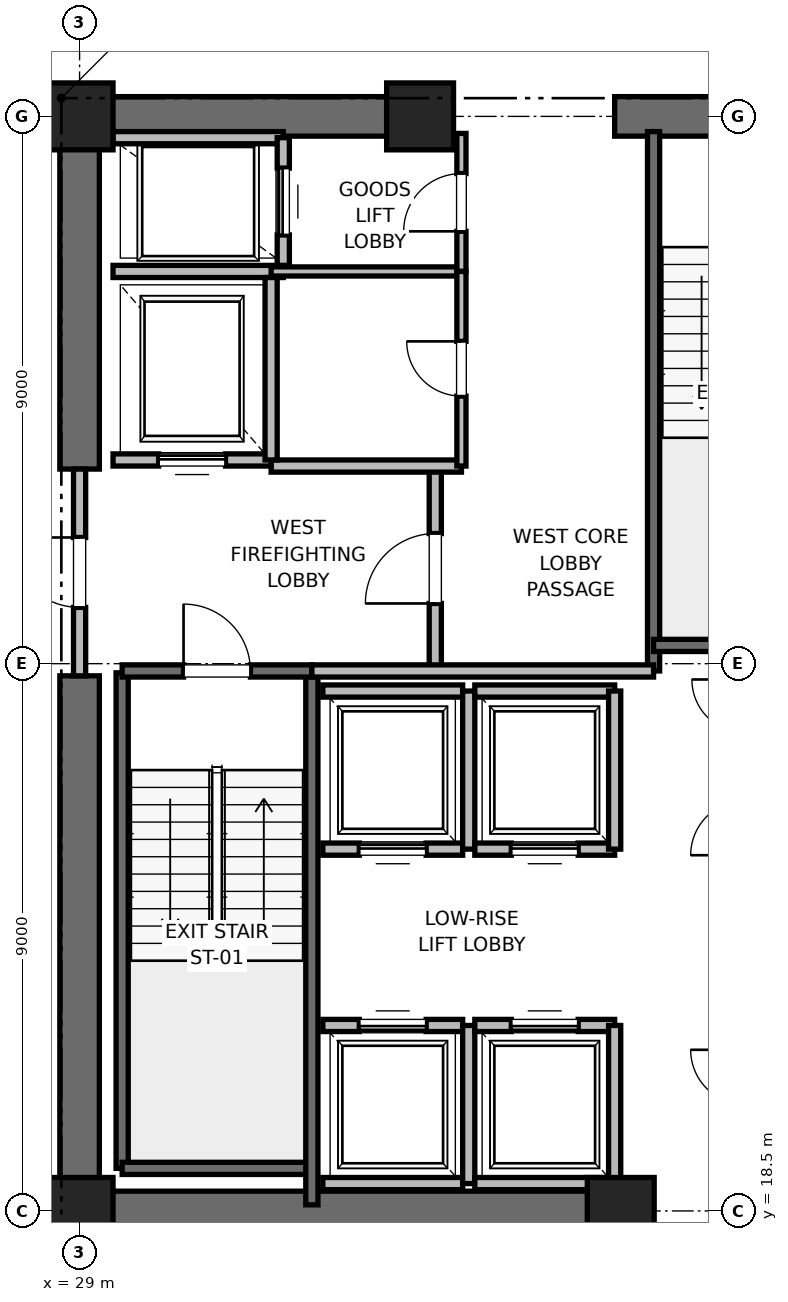
"""IFC4 building model, lengths in metres.
Left out: names, types, materials, properties, quantities, classifications, styles, units other than length and angle.
Written with IfcOpenShell. Run it as: python <this file> out.ifc"""

import sys

from ifc_helpers import new_model, si_unit, direction, frame, frame_2d, origin, origin_2d, place, context, subcontext, project, spatial, rectangle, extrude, element, fill, save


model = new_model("IFC4")
c1 = context("Model", 3, precision=1e-05, world=origin(), true_north=direction((0.0, 1.0)))
c2 = subcontext(c1, "Body", "Model", "MODEL_VIEW")
j1 = project(units=[si_unit("LENGTHUNIT", "METRE"), si_unit("PLANEANGLEUNIT", "RADIAN")], contexts=[c1])
p1 = place(None, origin())
s1 = spatial("IfcSite", under=j1, at=p1, CompositionType="ELEMENT")
p2 = place(p1, origin())
s2 = spatial("IfcBuilding", under=s1, at=p2, CompositionType="ELEMENT")
p3 = place(p2, frame((0.0, 0.0, 83.6)))
s3 = spatial("IfcBuildingStorey", under=s2, at=p3, CompositionType="ELEMENT", Elevation=83.6)
for number, where, z_axis, x_axis in (
    (1, (29.0, 18.5, 0.0), (0.0, 0.0, 1.0), (1.0, 0.0, 0.0)),
    (2, (29.0, 36.5, 0.0), (0.0, 0.0, 1.0), (1.0, 0.0, 0.0)),
    (3, (37.9, 18.5, 0.0), (0.0, 0.0, 1.0), (1.0, 0.0, 0.0)),
    (4, (34.6, 36.5, 0.0), (0.0, 0.0, 1.0), (1.0, 0.0, 0.0)),
):
    element("IfcColumn", number, at=place(p3, frame(where, z_axis=z_axis, x_axis=x_axis)), inside=s3, PredefinedType="PILASTER", context=c2, shape_type="SweptSolid", body=[
        extrude(rectangle(XDim=1.1, YDim=1.1, at=origin_2d()), origin(), (0.0, 0.0, 1.0), 4.0),
    ])
p4 = place(p3, frame((29.0, 18.5, 0.0), z_axis=(0.0, 0.0, 1.0), x_axis=(1.0, 0.0, 0.0)))
e5 = element("IfcWall", 5, at=p4, inside=s3, PredefinedType="SHEAR", context=c2, shape_type="SweptSolid", body=[
    extrude(rectangle(XDim=9.2, YDim=0.65, at=frame_2d((4.6, 0.0))), origin(), (0.0, 0.0, 1.0), 3.76),
])
p5 = place(p3, frame((29.0, 36.5, 0.0), z_axis=(0.0, 0.0, 1.0), x_axis=(1.0, 0.0, 0.0)))
e6 = element("IfcWall", 6, at=p5, inside=s3, PredefinedType="SHEAR", context=c2, shape_type="SweptSolid", body=[
    extrude(rectangle(XDim=5.8, YDim=0.65, at=frame_2d((2.9, 0.0))), origin(), (0.0, 0.0, 1.0), 3.76),
])
p6 = place(p3, frame((37.8, 36.5, 0.0), z_axis=(0.0, 0.0, 1.0), x_axis=(1.0, 0.0, 0.0)))
e7 = element("IfcWall", 7, at=p6, inside=s3, PredefinedType="SHEAR", context=c2, shape_type="SweptSolid", body=[
    extrude(rectangle(XDim=4.4, YDim=0.65, at=frame_2d((2.2, 0.0))), origin(), (0.0, 0.0, 1.0), 3.76),
])
p7 = place(p6, frame((1.65, 0.0, 0.0)))
e8 = element("IfcOpeningElement", 8, at=p7, cuts=e7, PredefinedType="OPENING", context=c2, shape_type="SweptSolid", body=[
    extrude(rectangle(XDim=1.1, YDim=2.15, at=frame_2d((0.55, 1.075))), frame((0.0, 0.325, 0.0), z_axis=(0.0, -1.0, 0.0), x_axis=(1.0, 0.0, 0.0)), (0.0, 0.0, 1.0), 0.65),
])
p8 = place(p3, frame((29.0, 18.5, 0.0), z_axis=(0.0, 0.0, 1.0), x_axis=(0.0, 1.0, 0.0)))
e9 = element("IfcWall", 9, at=p8, inside=s3, PredefinedType="SHEAR", context=c2, shape_type="SweptSolid", body=[
    extrude(rectangle(XDim=8.8, YDim=0.65, at=frame_2d((4.4, 0.0))), origin(), (0.0, 0.0, 1.0), 3.76),
])
p9 = place(p3, frame((29.0, 30.7, 0.0), z_axis=(0.0, 0.0, 1.0), x_axis=(0.0, 1.0, 0.0)))
e10 = element("IfcWall", 10, at=p9, inside=s3, PredefinedType="SHEAR", context=c2, shape_type="SweptSolid", body=[
    extrude(rectangle(XDim=5.8, YDim=0.65, at=frame_2d((2.9, 0.0))), origin(), (0.0, 0.0, 1.0), 3.76),
])
p10 = place(p3, frame((29.7, 19.2, 0.0), z_axis=(0.0, 0.0, 1.0), x_axis=(0.0, 1.0, 0.0)))
e11 = element("IfcWall", 11, at=p10, inside=s3, PredefinedType="SOLIDWALL", context=c2, shape_type="SweptSolid", body=[
    extrude(rectangle(XDim=8.15, YDim=0.2, at=frame_2d((4.075, 0.0))), origin(), (0.0, 0.0, 1.0), 3.76),
])
p11 = place(p3, frame((29.7, 19.2, 0.0), z_axis=(0.0, 0.0, 1.0), x_axis=(1.0, 0.0, 0.0)))
e12 = element("IfcWall", 12, at=p11, inside=s3, PredefinedType="SOLIDWALL", context=c2, shape_type="SweptSolid", body=[
    extrude(rectangle(XDim=3.12, YDim=0.2, at=frame_2d((1.56, 0.0))), origin(), (0.0, 0.0, 1.0), 3.76),
])
p12 = place(p3, frame((32.82, 18.6, 0.0), z_axis=(0.0, 0.0, 1.0), x_axis=(0.0, 1.0, 0.0)))
e13 = element("IfcWall", 13, at=p12, inside=s3, PredefinedType="SOLIDWALL", context=c2, shape_type="SweptSolid", body=[
    extrude(rectangle(XDim=8.78, YDim=0.2, at=frame_2d((4.39, 0.0))), origin(), (0.0, 0.0, 1.0), 3.76),
])
p13 = place(p3, frame((29.7, 27.38, 0.0), z_axis=(0.0, 0.0, 1.0), x_axis=(1.0, 0.0, 0.0)))
e14 = element("IfcWall", 14, at=p13, inside=s3, PredefinedType="SOLIDWALL", context=c2, shape_type="SweptSolid", body=[
    extrude(rectangle(XDim=3.12, YDim=0.2, at=frame_2d((1.56, 0.0))), origin(), (0.0, 0.0, 1.0), 3.76),
])
p14 = place(p13, frame((1.01, 0.0, 0.0)))
e15 = element("IfcOpeningElement", 15, at=p14, cuts=e14, PredefinedType="OPENING", context=c2, shape_type="SweptSolid", body=[
    extrude(rectangle(XDim=1.1, YDim=2.15, at=frame_2d((0.55, 1.075))), frame((0.0, 0.1, 0.0), z_axis=(0.0, -1.0, 0.0), x_axis=(1.0, 0.0, 0.0)), (0.0, 0.0, 1.0), 0.2),
])
p15 = place(p3, frame((38.44, 27.38, 0.0), z_axis=(0.0, 0.0, 1.0), x_axis=(0.0, 1.0, 0.0)))
e16 = element("IfcWall", 16, at=p15, inside=s3, PredefinedType="SOLIDWALL", context=c2, shape_type="SweptSolid", body=[
    extrude(rectangle(XDim=8.87, YDim=0.2, at=frame_2d((4.435, 0.0))), origin(), (0.0, 0.0, 1.0), 3.76),
])
p16 = place(p3, frame((38.44, 27.8, 0.0), z_axis=(0.0, 0.0, 1.0), x_axis=(1.0, 0.0, 0.0)))
e17 = element("IfcWall", 17, at=p16, inside=s3, PredefinedType="SOLIDWALL", context=c2, shape_type="SweptSolid", body=[
    extrude(rectangle(XDim=3.32, YDim=0.2, at=frame_2d((1.66, 0.0))), origin(), (0.0, 0.0, 1.0), 3.76),
])
p17 = place(p3, frame((34.85, 27.38, 0.0), z_axis=(0.0, 0.0, 1.0), x_axis=(0.0, 1.0, 0.0)))
e18 = element("IfcWall", 18, at=p17, inside=s3, PredefinedType="PARTITIONING", context=c2, shape_type="SweptSolid", body=[
    extrude(rectangle(XDim=3.37, YDim=0.2, at=frame_2d((1.685, 0.0))), origin(), (0.0, 0.0, 1.0), 3.76),
])
p18 = place(p17, frame((1.11, 0.0, 0.0)))
e19 = element("IfcOpeningElement", 19, at=p18, cuts=e18, PredefinedType="OPENING", context=c2, shape_type="SweptSolid", body=[
    extrude(rectangle(XDim=1.15, YDim=2.2, at=frame_2d((0.575, 1.1))), frame((0.0, 0.1, 0.0), z_axis=(0.0, -1.0, 0.0), x_axis=(1.0, 0.0, 0.0)), (0.0, 0.0, 1.0), 0.2),
])
p19 = place(p3, frame((29.0, 27.3, 0.0), z_axis=(0.0, 0.0, 1.0), x_axis=(0.0, 1.0, 0.0)))
e20 = element("IfcWall", 20, at=p19, inside=s3, PredefinedType="PARTITIONING", context=c2, shape_type="SweptSolid", body=[
    extrude(rectangle(XDim=3.4, YDim=0.2, at=frame_2d((1.7, 0.0))), origin(), (0.0, 0.0, 1.0), 2.54),
])
p20 = place(p19, frame((1.125, 0.0, 0.0)))
e21 = element("IfcOpeningElement", 21, at=p20, cuts=e20, PredefinedType="OPENING", context=c2, shape_type="SweptSolid", body=[
    extrude(rectangle(XDim=1.15, YDim=2.2, at=frame_2d((0.575, 1.1))), frame((0.0, 0.1, 0.0), z_axis=(0.0, -1.0, 0.0), x_axis=(1.0, 0.0, 0.0)), (0.0, 0.0, 1.0), 0.2),
])
p21 = place(p3, frame((32.82, 27.38, 0.0), z_axis=(0.0, 0.0, 1.0), x_axis=(1.0, 0.0, 0.0)))
e22 = element("IfcWall", 22, at=p21, inside=s3, PredefinedType="PARTITIONING", context=c2, shape_type="SweptSolid", body=[
    extrude(rectangle(XDim=5.62, YDim=0.2, at=frame_2d((2.81, 0.0))), origin(), (0.0, 0.0, 1.0), 3.76),
])
p22 = place(p3, frame((32.15, 30.75, 0.0), z_axis=(0.0, 0.0, 1.0), x_axis=(1.0, 0.0, 0.0)))
e23 = element("IfcWall", 23, at=p22, inside=s3, PredefinedType="PARTITIONING", context=c2, shape_type="SweptSolid", body=[
    extrude(rectangle(XDim=3.13, YDim=0.2, at=frame_2d((1.565, 0.0))), origin(), (0.0, 0.0, 1.0), 3.76),
])
p23 = place(p3, frame((29.55, 30.85, 0.0), z_axis=(0.0, 0.0, 1.0), x_axis=(1.0, 0.0, 0.0)))
e24 = element("IfcWall", 24, at=p23, inside=s3, PredefinedType="SOLIDWALL", context=c2, shape_type="SweptSolid", body=[
    extrude(rectangle(XDim=2.6, YDim=0.2, at=frame_2d((1.3, 0.0))), origin(), (0.0, 0.0, 1.0), 2.54),
])
p24 = place(p23, frame((0.75, 0.0, 0.0)))
e25 = element("IfcOpeningElement", 25, at=p24, cuts=e24, PredefinedType="OPENING", context=c2, shape_type="SweptSolid", body=[
    extrude(rectangle(XDim=1.1, YDim=2.2, at=frame_2d((0.55, 1.1))), frame((0.0, 0.1, 0.0), z_axis=(0.0, -1.0, 0.0), x_axis=(1.0, 0.0, 0.0)), (0.0, 0.0, 1.0), 0.2),
])
p25 = place(p3, frame((29.55, 33.95, 0.0), z_axis=(0.0, 0.0, 1.0), x_axis=(1.0, 0.0, 0.0)))
e26 = element("IfcWall", 26, at=p25, inside=s3, PredefinedType="SOLIDWALL", context=c2, shape_type="SweptSolid", body=[
    extrude(rectangle(XDim=2.8, YDim=0.2, at=frame_2d((1.4, 0.0))), origin(), (0.0, 0.0, 1.0), 3.76),
])
p26 = place(p3, frame((32.15, 30.85, 0.0), z_axis=(0.0, 0.0, 1.0), x_axis=(0.0, 1.0, 0.0)))
e27 = element("IfcWall", 27, at=p26, inside=s3, PredefinedType="SOLIDWALL", context=c2, shape_type="SweptSolid", body=[
    extrude(rectangle(XDim=3.0, YDim=0.2, at=frame_2d((1.5, 0.0))), origin(), (0.0, 0.0, 1.0), 3.76),
])
p27 = place(p3, frame((32.35, 36.15, 0.0), z_axis=(0.0, 0.0, 1.0), x_axis=(-1.0, 0.0, 0.0)))
e28 = element("IfcWall", 28, at=p27, inside=s3, PredefinedType="SOLIDWALL", context=c2, shape_type="SweptSolid", body=[
    extrude(rectangle(XDim=2.8, YDim=0.2, at=frame_2d((1.4, 0.0))), origin(), (0.0, 0.0, 1.0), 2.889),
])
p28 = place(p3, frame((32.35, 34.05, 0.0), z_axis=(0.0, 0.0, 1.0), x_axis=(0.0, 1.0, 0.0)))
e29 = element("IfcWall", 29, at=p28, inside=s3, PredefinedType="SOLIDWALL", context=c2, shape_type="SweptSolid", body=[
    extrude(rectangle(XDim=2.1, YDim=0.2, at=frame_2d((1.05, 0.0))), origin(), (0.0, 0.0, 1.0), 3.76),
])
p29 = place(p28, frame((0.5, 0.0, 0.0)))
e30 = element("IfcOpeningElement", 30, at=p29, cuts=e29, PredefinedType="OPENING", context=c2, shape_type="SweptSolid", body=[
    extrude(rectangle(XDim=1.1, YDim=2.2, at=frame_2d((0.55, 1.1))), frame((0.0, 0.1, 0.0), z_axis=(0.0, -1.0, 0.0), x_axis=(1.0, 0.0, 0.0)), (0.0, 0.0, 1.0), 0.2),
])
p30 = place(p3, frame((33.0, 18.95, 0.0), z_axis=(0.0, 0.0, 1.0), x_axis=(1.0, 0.0, 0.0)))
e31 = element("IfcWall", 31, at=p30, inside=s3, PredefinedType="SOLIDWALL", context=c2, shape_type="SweptSolid", body=[
    extrude(rectangle(XDim=2.3, YDim=0.2, at=frame_2d((1.15, 0.0))), origin(), (0.0, 0.0, 1.0), 3.76),
])
p31 = place(p3, frame((35.3, 21.55, 0.0), z_axis=(0.0, 0.0, 1.0), x_axis=(-1.0, 0.0, 0.0)))
e32 = element("IfcWall", 32, at=p31, inside=s3, PredefinedType="SOLIDWALL", context=c2, shape_type="SweptSolid", body=[
    extrude(rectangle(XDim=2.3, YDim=0.2, at=frame_2d((1.15, 0.0))), origin(), (0.0, 0.0, 1.0), 3.76),
])
p32 = place(p31, frame((0.6, 0.0, 0.0)))
e33 = element("IfcOpeningElement", 33, at=p32, cuts=e32, PredefinedType="OPENING", context=c2, shape_type="SweptSolid", body=[
    extrude(rectangle(XDim=1.1, YDim=2.2, at=frame_2d((0.55, 1.1))), frame((0.0, 0.1, 0.0), z_axis=(0.0, -1.0, 0.0), x_axis=(1.0, 0.0, 0.0)), (0.0, 0.0, 1.0), 0.2),
])
p33 = place(p3, frame((35.4, 18.95, 0.0), z_axis=(0.0, 0.0, 1.0), x_axis=(0.0, 1.0, 0.0)))
e34 = element("IfcWall", 34, at=p33, inside=s3, PredefinedType="SOLIDWALL", context=c2, shape_type="SweptSolid", body=[
    extrude(rectangle(XDim=2.6, YDim=0.2, at=frame_2d((1.3, 0.0))), origin(), (0.0, 0.0, 1.0), 3.76),
])
p34 = place(p3, frame((35.5, 18.95, 0.0), z_axis=(0.0, 0.0, 1.0), x_axis=(1.0, 0.0, 0.0)))
e35 = element("IfcWall", 35, at=p34, inside=s3, PredefinedType="SOLIDWALL", context=c2, shape_type="SweptSolid", body=[
    extrude(rectangle(XDim=2.3, YDim=0.2, at=frame_2d((1.15, 0.0))), origin(), (0.0, 0.0, 1.0), 2.54),
])
p35 = place(p3, frame((37.8, 21.55, 0.0), z_axis=(0.0, 0.0, 1.0), x_axis=(-1.0, 0.0, 0.0)))
e36 = element("IfcWall", 36, at=p35, inside=s3, PredefinedType="SOLIDWALL", context=c2, shape_type="SweptSolid", body=[
    extrude(rectangle(XDim=2.3, YDim=0.2, at=frame_2d((1.15, 0.0))), origin(), (0.0, 0.0, 1.0), 3.76),
])
p36 = place(p35, frame((0.6, 0.0, 0.0)))
e37 = element("IfcOpeningElement", 37, at=p36, cuts=e36, PredefinedType="OPENING", context=c2, shape_type="SweptSolid", body=[
    extrude(rectangle(XDim=1.1, YDim=2.2, at=frame_2d((0.55, 1.1))), frame((0.0, 0.1, 0.0), z_axis=(0.0, -1.0, 0.0), x_axis=(1.0, 0.0, 0.0)), (0.0, 0.0, 1.0), 0.2),
])
p37 = place(p3, frame((37.8, 18.95, 0.0), z_axis=(0.0, 0.0, 1.0), x_axis=(0.0, 1.0, 0.0)))
e38 = element("IfcWall", 38, at=p37, inside=s3, PredefinedType="SOLIDWALL", context=c2, shape_type="SweptSolid", body=[
    extrude(rectangle(XDim=2.6, YDim=0.2, at=frame_2d((1.3, 0.0))), origin(), (0.0, 0.0, 1.0), 2.54),
])
p38 = place(p3, frame((33.0, 24.45, 0.0), z_axis=(0.0, 0.0, 1.0), x_axis=(1.0, 0.0, 0.0)))
e39 = element("IfcWall", 39, at=p38, inside=s3, PredefinedType="SOLIDWALL", context=c2, shape_type="SweptSolid", body=[
    extrude(rectangle(XDim=2.3, YDim=0.2, at=frame_2d((1.15, 0.0))), origin(), (0.0, 0.0, 1.0), 3.76),
])
p39 = place(p38, frame((0.6, 0.0, 0.0)))
e40 = element("IfcOpeningElement", 40, at=p39, cuts=e39, PredefinedType="OPENING", context=c2, shape_type="SweptSolid", body=[
    extrude(rectangle(XDim=1.1, YDim=2.2, at=frame_2d((0.55, 1.1))), frame((0.0, 0.1, 0.0), z_axis=(0.0, -1.0, 0.0), x_axis=(1.0, 0.0, 0.0)), (0.0, 0.0, 1.0), 0.2),
])
p40 = place(p3, frame((35.3, 27.05, 0.0), z_axis=(0.0, 0.0, 1.0), x_axis=(-1.0, 0.0, 0.0)))
e41 = element("IfcWall", 41, at=p40, inside=s3, PredefinedType="SOLIDWALL", context=c2, shape_type="SweptSolid", body=[
    extrude(rectangle(XDim=2.3, YDim=0.2, at=frame_2d((1.15, 0.0))), origin(), (0.0, 0.0, 1.0), 3.76),
])
p41 = place(p3, frame((35.4, 24.45, 0.0), z_axis=(0.0, 0.0, 1.0), x_axis=(0.0, 1.0, 0.0)))
e42 = element("IfcWall", 42, at=p41, inside=s3, PredefinedType="SOLIDWALL", context=c2, shape_type="SweptSolid", body=[
    extrude(rectangle(XDim=2.6, YDim=0.2, at=frame_2d((1.3, 0.0))), origin(), (0.0, 0.0, 1.0), 3.76),
])
p42 = place(p3, frame((35.5, 24.45, 0.0), z_axis=(0.0, 0.0, 1.0), x_axis=(1.0, 0.0, 0.0)))
e43 = element("IfcWall", 43, at=p42, inside=s3, PredefinedType="SOLIDWALL", context=c2, shape_type="SweptSolid", body=[
    extrude(rectangle(XDim=2.3, YDim=0.2, at=frame_2d((1.15, 0.0))), origin(), (0.0, 0.0, 1.0), 3.76),
])
p43 = place(p42, frame((0.6, 0.0, 0.0)))
e44 = element("IfcOpeningElement", 44, at=p43, cuts=e43, PredefinedType="OPENING", context=c2, shape_type="SweptSolid", body=[
    extrude(rectangle(XDim=1.1, YDim=2.2, at=frame_2d((0.55, 1.1))), frame((0.0, 0.1, 0.0), z_axis=(0.0, -1.0, 0.0), x_axis=(1.0, 0.0, 0.0)), (0.0, 0.0, 1.0), 0.2),
])
p44 = place(p3, frame((37.8, 27.05, 0.0), z_axis=(0.0, 0.0, 1.0), x_axis=(-1.0, 0.0, 0.0)))
e45 = element("IfcWall", 45, at=p44, inside=s3, PredefinedType="SOLIDWALL", context=c2, shape_type="SweptSolid", body=[
    extrude(rectangle(XDim=2.3, YDim=0.2, at=frame_2d((1.15, 0.0))), origin(), (0.0, 0.0, 1.0), 3.76),
])
p45 = place(p3, frame((37.8, 24.45, 0.0), z_axis=(0.0, 0.0, 1.0), x_axis=(0.0, 1.0, 0.0)))
e46 = element("IfcWall", 46, at=p45, inside=s3, PredefinedType="SOLIDWALL", context=c2, shape_type="SweptSolid", body=[
    extrude(rectangle(XDim=2.6, YDim=0.2, at=frame_2d((1.3, 0.0))), origin(), (0.0, 0.0, 1.0), 3.76),
])
p46 = place(p3, frame((32.15, 33.95, 0.0), z_axis=(0.0, 0.0, 1.0), x_axis=(1.0, 0.0, 0.0)))
e47 = element("IfcWall", 47, at=p46, inside=s3, PredefinedType="PARTITIONING", context=c2, shape_type="SweptSolid", body=[
    extrude(rectangle(XDim=3.13, YDim=0.15, at=frame_2d((1.565, 0.0))), origin(), (0.0, 0.0, 1.0), 2.85),
])
p47 = place(p3, frame((35.28, 33.95, 0.0), z_axis=(0.0, 0.0, 1.0), x_axis=(0.0, 1.0, 0.0)))
e48 = element("IfcWall", 48, at=p47, inside=s3, PredefinedType="PARTITIONING", context=c2, shape_type="SweptSolid", body=[
    extrude(rectangle(XDim=2.27, YDim=0.15, at=frame_2d((1.135, 0.0))), origin(), (0.0, 0.0, 1.0), 2.54),
])
p48 = place(p47, frame((0.66, 0.0, 0.0)))
e49 = element("IfcOpeningElement", 49, at=p48, cuts=e48, PredefinedType="OPENING", context=c2, shape_type="SweptSolid", body=[
    extrude(rectangle(XDim=0.95, YDim=2.15, at=frame_2d((0.475, 1.075))), frame((0.0, 0.075, 0.0), z_axis=(0.0, -1.0, 0.0), x_axis=(1.0, 0.0, 0.0)), (0.0, 0.0, 1.0), 0.15),
])
p49 = place(p3, frame((35.28, 30.75, 0.0), z_axis=(0.0, 0.0, 1.0), x_axis=(0.0, 1.0, 0.0)))
e50 = element("IfcWall", 50, at=p49, inside=s3, PredefinedType="PARTITIONING", context=c2, shape_type="SweptSolid", body=[
    extrude(rectangle(XDim=3.2, YDim=0.15, at=frame_2d((1.6, 0.0))), origin(), (0.0, 0.0, 1.0), 2.85),
])
p50 = place(p49, frame((1.15, 0.0, 0.0)))
e51 = element("IfcOpeningElement", 51, at=p50, cuts=e50, PredefinedType="OPENING", context=c2, shape_type="SweptSolid", body=[
    extrude(rectangle(XDim=0.9, YDim=2.1, at=frame_2d((0.45, 1.05))), frame((0.0, 0.075, 0.0), z_axis=(0.0, -1.0, 0.0), x_axis=(1.0, 0.0, 0.0)), (0.0, 0.0, 1.0), 0.15),
])
p51 = place(p14, origin())
e52 = element("IfcDoor", 52, at=p51, inside=s3, OperationType="SINGLE_SWING_LEFT", PredefinedType="DOOR", context=c2, shape_type="SweptSolid", body=[
    extrude(rectangle(XDim=1.1, YDim=2.15, at=frame_2d((0.55, 1.075))), frame((0.0, 0.025, 0.0), z_axis=(0.0, -1.0, 0.0), x_axis=(1.0, 0.0, 0.0)), (0.0, 0.0, 1.0), 0.05),
])
fill(e15, e52)
p52 = place(p18, origin())
e53 = element("IfcDoor", 53, at=p52, inside=s3, OperationType="SINGLE_SWING_LEFT", PredefinedType="DOOR", context=c2, shape_type="SweptSolid", body=[
    extrude(rectangle(XDim=1.15, YDim=2.2, at=frame_2d((0.575, 1.1))), frame((0.0, 0.025, 0.0), z_axis=(0.0, -1.0, 0.0), x_axis=(1.0, 0.0, 0.0)), (0.0, 0.0, 1.0), 0.05),
])
fill(e19, e53)
p53 = place(p20, origin())
e54 = element("IfcDoor", 54, at=p53, inside=s3, OperationType="SINGLE_SWING_RIGHT", PredefinedType="DOOR", context=c2, shape_type="SweptSolid", body=[
    extrude(rectangle(XDim=1.15, YDim=2.2, at=frame_2d((0.575, 1.1))), frame((0.0, 0.025, 0.0), z_axis=(0.0, -1.0, 0.0), x_axis=(1.0, 0.0, 0.0)), (0.0, 0.0, 1.0), 0.05),
])
fill(e21, e54)
p54 = place(p24, origin())
e55 = element("IfcDoor", 55, at=p54, inside=s3, OperationType="SLIDING_TO_RIGHT", PredefinedType="DOOR", context=c2, shape_type="SweptSolid", body=[
    extrude(rectangle(XDim=1.1, YDim=2.2, at=frame_2d((0.55, 1.1))), frame((0.0, 0.025, 0.0), z_axis=(0.0, -1.0, 0.0), x_axis=(1.0, 0.0, 0.0)), (0.0, 0.0, 1.0), 0.05),
])
fill(e25, e55)
p55 = place(p29, origin())
e56 = element("IfcDoor", 56, at=p55, inside=s3, OperationType="SLIDING_TO_RIGHT", PredefinedType="DOOR", context=c2, shape_type="SweptSolid", body=[
    extrude(rectangle(XDim=1.1, YDim=2.2, at=frame_2d((0.55, 1.1))), frame((0.0, 0.025, 0.0), z_axis=(0.0, -1.0, 0.0), x_axis=(1.0, 0.0, 0.0)), (0.0, 0.0, 1.0), 0.05),
])
fill(e30, e56)
p56 = place(p32, origin())
e57 = element("IfcDoor", 57, at=p56, inside=s3, OperationType="SLIDING_TO_RIGHT", PredefinedType="DOOR", context=c2, shape_type="SweptSolid", body=[
    extrude(rectangle(XDim=1.1, YDim=2.2, at=frame_2d((0.55, 1.1))), frame((0.0, 0.025, 0.0), z_axis=(0.0, -1.0, 0.0), x_axis=(1.0, 0.0, 0.0)), (0.0, 0.0, 1.0), 0.05),
])
fill(e33, e57)
p57 = place(p36, origin())
e58 = element("IfcDoor", 58, at=p57, inside=s3, OperationType="SLIDING_TO_RIGHT", PredefinedType="DOOR", context=c2, shape_type="SweptSolid", body=[
    extrude(rectangle(XDim=1.1, YDim=2.2, at=frame_2d((0.55, 1.1))), frame((0.0, 0.025, 0.0), z_axis=(0.0, -1.0, 0.0), x_axis=(1.0, 0.0, 0.0)), (0.0, 0.0, 1.0), 0.05),
])
fill(e37, e58)
p58 = place(p39, origin())
e59 = element("IfcDoor", 59, at=p58, inside=s3, OperationType="SLIDING_TO_RIGHT", PredefinedType="DOOR", context=c2, shape_type="SweptSolid", body=[
    extrude(rectangle(XDim=1.1, YDim=2.2, at=frame_2d((0.55, 1.1))), frame((0.0, 0.025, 0.0), z_axis=(0.0, -1.0, 0.0), x_axis=(1.0, 0.0, 0.0)), (0.0, 0.0, 1.0), 0.05),
])
fill(e40, e59)
p59 = place(p43, origin())
e60 = element("IfcDoor", 60, at=p59, inside=s3, OperationType="SLIDING_TO_RIGHT", PredefinedType="DOOR", context=c2, shape_type="SweptSolid", body=[
    extrude(rectangle(XDim=1.1, YDim=2.2, at=frame_2d((0.55, 1.1))), frame((0.0, 0.025, 0.0), z_axis=(0.0, -1.0, 0.0), x_axis=(1.0, 0.0, 0.0)), (0.0, 0.0, 1.0), 0.05),
])
fill(e44, e60)
p60 = place(p48, origin())
e61 = element("IfcDoor", 61, at=p60, inside=s3, OperationType="SINGLE_SWING_LEFT", PredefinedType="DOOR", context=c2, shape_type="SweptSolid", body=[
    extrude(rectangle(XDim=0.95, YDim=2.15, at=frame_2d((0.475, 1.075))), frame((0.0, 0.025, 0.0), z_axis=(0.0, -1.0, 0.0), x_axis=(1.0, 0.0, 0.0)), (0.0, 0.0, 1.0), 0.05),
])
fill(e49, e61)
p61 = place(p50, origin())
e62 = element("IfcDoor", 62, at=p61, inside=s3, OperationType="SINGLE_SWING_RIGHT", PredefinedType="DOOR", context=c2, shape_type="SweptSolid", body=[
    extrude(rectangle(XDim=0.9, YDim=2.1, at=frame_2d((0.45, 1.05))), frame((0.0, 0.025, 0.0), z_axis=(0.0, -1.0, 0.0), x_axis=(1.0, 0.0, 0.0)), (0.0, 0.0, 1.0), 0.05),
])
fill(e51, e62)
save(model, sys.argv[1])
